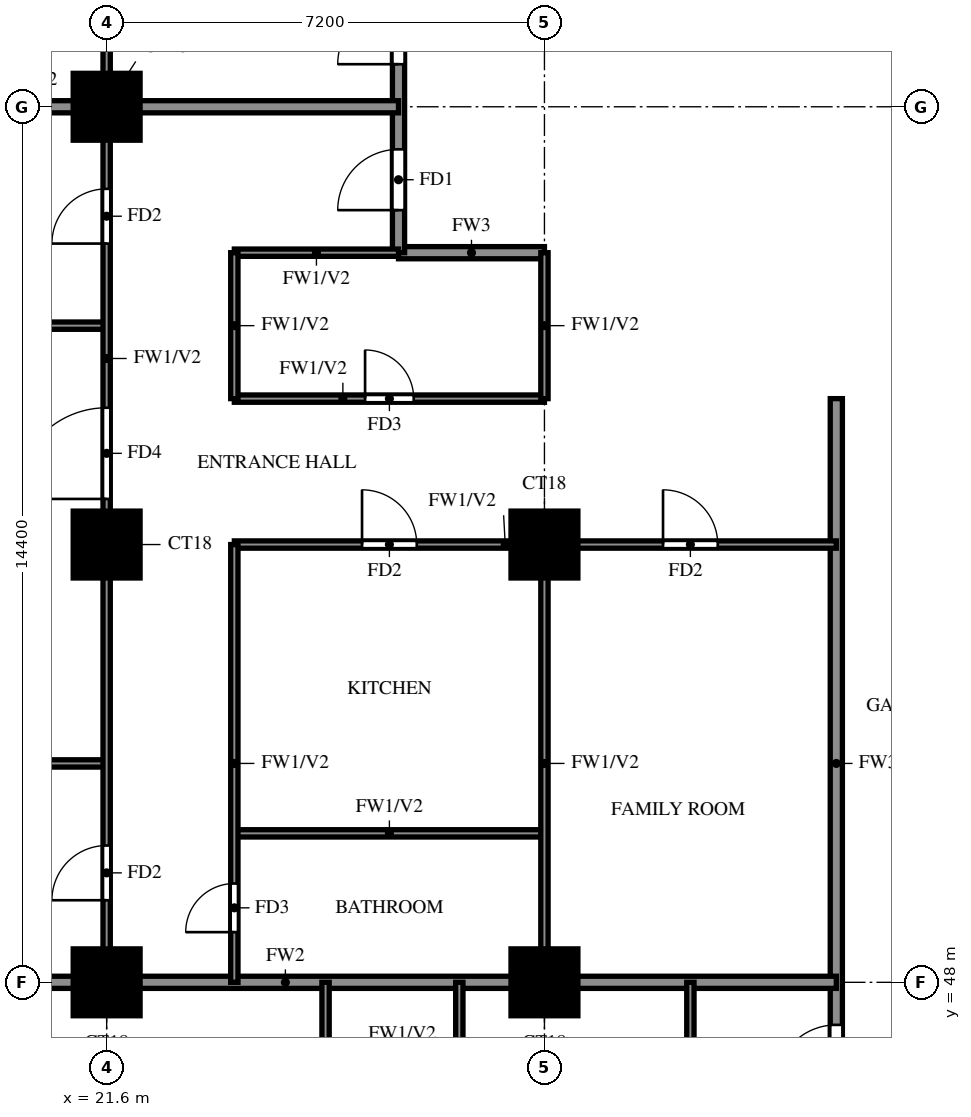
"""IFC4 building model, lengths in metres.
Left out: names, types, materials, properties, quantities, classifications, styles, units other than length and angle.
Written with IfcOpenShell. Run it as: python <this file> out.ifc"""

import sys

from ifc_helpers import new_model, si_unit, direction, frame, frame_2d, origin, origin_2d, place, context, subcontext, project, spatial, rectangle, extrude, source, transform, mapped, element, fill, save


model = new_model("IFC4")
c1 = context("Model", 3, precision=1e-05, world=origin(), true_north=direction((0.0, 1.0)))
c2 = subcontext(c1, "Body", "Model", "MODEL_VIEW")
j1 = project(units=[si_unit("LENGTHUNIT", "METRE"), si_unit("PLANEANGLEUNIT", "RADIAN")], contexts=[c1])
p1 = place(None, origin())
s1 = spatial("IfcSite", under=j1, at=p1, CompositionType="ELEMENT")
p2 = place(p1, origin())
s2 = spatial("IfcBuilding", under=s1, at=p2, CompositionType="ELEMENT")
p3 = place(p2, frame((0.0, 0.0, 113.0)))
s3 = spatial("IfcBuildingStorey", under=s2, at=p3, CompositionType="ELEMENT", Elevation=113.0)
m1 = source(origin(), c2, "Body", "SweptSolid", [
    extrude(rectangle(XDim=1.1, YDim=1.1, at=origin_2d()), origin(), (0.0, 0.0, 1.0), 3.2),
])
for number, where, z_axis, x_axis in (
    (1, (21.6, 48.0, 0.0), (0.0, 0.0, 1.0), (1.0, 0.0, 0.0)),
    (2, (28.8, 48.0, 0.0), (0.0, 0.0, 1.0), (1.0, 0.0, 0.0)),
    (3, (21.6, 55.2, 0.0), (0.0, 0.0, 1.0), (1.0, 0.0, 0.0)),
    (4, (28.8, 55.2, 0.0), (0.0, 0.0, 1.0), (1.0, 0.0, 0.0)),
    (5, (21.6, 62.4, 0.0), (0.0, 0.0, 1.0), (1.0, 0.0, 0.0)),
):
    element("IfcColumn", number, at=place(p3, frame(where, z_axis=z_axis, x_axis=x_axis)), inside=s3, PredefinedType="COLUMN", context=c2, shape_type="MappedRepresentation", body=[
        mapped(m1, transform((0.0, 0.0, 0.0))),
    ])
p4 = place(p3, frame((26.4, 60.0, 0.0), z_axis=(0.0, 0.0, 1.0), x_axis=(1.0, 0.0, 0.0)))
e6 = element("IfcWall", 6, at=p4, inside=s3, PredefinedType="SOLIDWALL", context=c2, shape_type="SweptSolid", body=[
    extrude(rectangle(XDim=2.4, YDim=0.2, at=frame_2d((1.2, 0.0))), origin(), (0.0, 0.0, 1.0), 3.2),
])
p5 = place(p3, frame((26.4, 60.0, 0.0), z_axis=(0.0, 0.0, 1.0), x_axis=(0.0, 1.0, 0.0)))
e7 = element("IfcWall", 7, at=p5, inside=s3, PredefinedType="SOLIDWALL", context=c2, shape_type="SweptSolid", body=[
    extrude(rectangle(XDim=9.6, YDim=0.2, at=frame_2d((4.8, 0.0))), origin(), (0.0, 0.0, 1.0), 3.2),
])
p6 = place(p5, frame((0.7, 0.0, 0.0)))
e8 = element("IfcOpeningElement", 8, at=p6, cuts=e7, PredefinedType="OPENING", context=c2, shape_type="SweptSolid", body=[
    extrude(rectangle(XDim=1.0, YDim=2.1, at=frame_2d((0.5, 1.05))), frame((0.0, 0.11, 0.0), z_axis=(0.0, -1.0, 0.0), x_axis=(1.0, 0.0, 0.0)), (0.0, 0.0, 1.0), 0.22),
])
p7 = place(p5, frame((3.1, 0.0, 0.0)))
e9 = element("IfcOpeningElement", 9, at=p7, cuts=e7, PredefinedType="OPENING", context=c2, shape_type="SweptSolid", body=[
    extrude(rectangle(XDim=1.0, YDim=2.1, at=frame_2d((0.5, 1.05))), frame((0.0, 0.11, 0.0), z_axis=(0.0, -1.0, 0.0), x_axis=(1.0, 0.0, 0.0)), (0.0, 0.0, 1.0), 0.22),
])
p8 = place(p3, frame((33.6, 45.6, 0.0), z_axis=(0.0, 0.0, 1.0), x_axis=(0.0, 1.0, 0.0)))
e10 = element("IfcWall", 10, at=p8, inside=s3, PredefinedType="SOLIDWALL", context=c2, shape_type="SweptSolid", body=[
    extrude(rectangle(XDim=12.0, YDim=0.2, at=frame_2d((6.0, 0.0))), origin(), (0.0, 0.0, 1.0), 3.2),
])
p9 = place(p8, frame((0.7, 0.0, 0.0)))
e11 = element("IfcOpeningElement", 11, at=p9, cuts=e10, PredefinedType="OPENING", context=c2, shape_type="SweptSolid", body=[
    extrude(rectangle(XDim=1.0, YDim=2.1, at=frame_2d((0.5, 1.05))), frame((0.0, 0.11, 0.0), z_axis=(0.0, -1.0, 0.0), x_axis=(1.0, 0.0, 0.0)), (0.0, 0.0, 1.0), 0.22),
])
p10 = place(p3, frame((14.525, 48.0, 0.0), z_axis=(0.0, 0.0, 1.0), x_axis=(1.0, 0.0, 0.0)))
e12 = element("IfcWall", 12, at=p10, inside=s3, PredefinedType="SOLIDWALL", context=c2, shape_type="SweptSolid", body=[
    extrude(rectangle(XDim=19.075, YDim=0.2, at=frame_2d((9.538, 0.0))), origin(), (0.0, 0.0, 1.0), 3.2),
])
p11 = place(p3, frame((14.525, 62.4, 0.0), z_axis=(0.0, 0.0, 1.0), x_axis=(1.0, 0.0, 0.0)))
e13 = element("IfcWall", 13, at=p11, inside=s3, PredefinedType="SOLIDWALL", context=c2, shape_type="SweptSolid", body=[
    extrude(rectangle(XDim=11.875, YDim=0.2, at=frame_2d((5.938, 0.0))), origin(), (0.0, 0.0, 1.0), 3.2),
])
p12 = place(p3, frame((23.7, 50.45, 0.0), z_axis=(0.0, 0.0, 1.0), x_axis=(1.0, 0.0, 0.0)))
e14 = element("IfcWall", 14, at=p12, inside=s3, PredefinedType="PARTITIONING", context=c2, shape_type="SweptSolid", body=[
    extrude(rectangle(XDim=5.1, YDim=0.12, at=frame_2d((2.55, 0.0))), origin(), (0.0, 0.0, 1.0), 3.2),
])
p13 = place(p3, frame((14.525, 51.6, 0.0), z_axis=(0.0, 0.0, 1.0), x_axis=(1.0, 0.0, 0.0)))
e15 = element("IfcWall", 15, at=p13, inside=s3, PredefinedType="PARTITIONING", context=c2, shape_type="SweptSolid", body=[
    extrude(rectangle(XDim=7.075, YDim=0.12, at=frame_2d((3.538, 0.0))), origin(), (0.0, 0.0, 1.0), 2.3),
])
p14 = place(p3, frame((23.7, 55.2, 0.0), z_axis=(0.0, 0.0, 1.0), x_axis=(1.0, 0.0, 0.0)))
e16 = element("IfcWall", 16, at=p14, inside=s3, PredefinedType="PARTITIONING", context=c2, shape_type="SweptSolid", body=[
    extrude(rectangle(XDim=9.9, YDim=0.12, at=frame_2d((4.95, 0.0))), origin(), (0.0, 0.0, 1.0), 3.2),
])
p15 = place(p14, frame((2.1, 0.0, 0.0)))
e17 = element("IfcOpeningElement", 17, at=p15, cuts=e16, PredefinedType="OPENING", context=c2, shape_type="SweptSolid", body=[
    extrude(rectangle(XDim=0.9, YDim=2.1, at=frame_2d((0.45, 1.05))), frame((0.0, 0.07, 0.0), z_axis=(0.0, -1.0, 0.0), x_axis=(1.0, 0.0, 0.0)), (0.0, 0.0, 1.0), 0.14),
])
p16 = place(p14, frame((7.05, 0.0, 0.0)))
e18 = element("IfcOpeningElement", 18, at=p16, cuts=e16, PredefinedType="OPENING", context=c2, shape_type="SweptSolid", body=[
    extrude(rectangle(XDim=0.9, YDim=2.1, at=frame_2d((0.45, 1.05))), frame((0.0, 0.07, 0.0), z_axis=(0.0, -1.0, 0.0), x_axis=(1.0, 0.0, 0.0)), (0.0, 0.0, 1.0), 0.14),
])
p17 = place(p3, frame((23.7, 57.6, 0.0), z_axis=(0.0, 0.0, 1.0), x_axis=(1.0, 0.0, 0.0)))
e19 = element("IfcWall", 19, at=p17, inside=s3, PredefinedType="PARTITIONING", context=c2, shape_type="SweptSolid", body=[
    extrude(rectangle(XDim=5.1, YDim=0.12, at=frame_2d((2.55, 0.0))), origin(), (0.0, 0.0, 1.0), 3.2),
])
p18 = place(p17, frame((2.15, 0.0, 0.0)))
e20 = element("IfcOpeningElement", 20, at=p18, cuts=e19, PredefinedType="OPENING", context=c2, shape_type="SweptSolid", body=[
    extrude(rectangle(XDim=0.8, YDim=2.1, at=frame_2d((0.4, 1.05))), frame((0.0, 0.07, 0.0), z_axis=(0.0, -1.0, 0.0), x_axis=(1.0, 0.0, 0.0)), (0.0, 0.0, 1.0), 0.14),
])
p19 = place(p3, frame((14.525, 58.8, 0.0), z_axis=(0.0, 0.0, 1.0), x_axis=(1.0, 0.0, 0.0)))
e21 = element("IfcWall", 21, at=p19, inside=s3, PredefinedType="PARTITIONING", context=c2, shape_type="SweptSolid", body=[
    extrude(rectangle(XDim=7.075, YDim=0.12, at=frame_2d((3.538, 0.0))), origin(), (0.0, 0.0, 1.0), 2.3),
])
p20 = place(p3, frame((23.7, 60.0, 0.0), z_axis=(0.0, 0.0, 1.0), x_axis=(1.0, 0.0, 0.0)))
e22 = element("IfcWall", 22, at=p20, inside=s3, PredefinedType="PARTITIONING", context=c2, shape_type="SweptSolid", body=[
    extrude(rectangle(XDim=2.7, YDim=0.12, at=frame_2d((1.35, 0.0))), origin(), (0.0, 0.0, 1.0), 3.2),
])
p21 = place(p3, frame((21.6, 48.0, 0.0), z_axis=(0.0, 0.0, 1.0), x_axis=(0.0, 1.0, 0.0)))
e23 = element("IfcWall", 23, at=p21, inside=s3, PredefinedType="PARTITIONING", context=c2, shape_type="SweptSolid", body=[
    extrude(rectangle(XDim=21.6, YDim=0.12, at=frame_2d((10.8, 0.0))), origin(), (0.0, 0.0, 1.0), 3.2),
])
p22 = place(p21, frame((1.35, 0.0, 0.0)))
e24 = element("IfcOpeningElement", 24, at=p22, cuts=e23, PredefinedType="OPENING", context=c2, shape_type="SweptSolid", body=[
    extrude(rectangle(XDim=0.9, YDim=2.1, at=frame_2d((0.45, 1.05))), frame((0.0, 0.07, 0.0), z_axis=(0.0, -1.0, 0.0), x_axis=(1.0, 0.0, 0.0)), (0.0, 0.0, 1.0), 0.14),
])
p23 = place(p21, frame((7.95, 0.0, 0.0)))
e25 = element("IfcOpeningElement", 25, at=p23, cuts=e23, PredefinedType="OPENING", context=c2, shape_type="SweptSolid", body=[
    extrude(rectangle(XDim=1.5, YDim=2.1, at=frame_2d((0.75, 1.05))), frame((0.0, 0.07, 0.0), z_axis=(0.0, -1.0, 0.0), x_axis=(1.0, 0.0, 0.0)), (0.0, 0.0, 1.0), 0.14),
])
p24 = place(p21, frame((12.15, 0.0, 0.0)))
e26 = element("IfcOpeningElement", 26, at=p24, cuts=e23, PredefinedType="OPENING", context=c2, shape_type="SweptSolid", body=[
    extrude(rectangle(XDim=0.9, YDim=2.1, at=frame_2d((0.45, 1.05))), frame((0.0, 0.07, 0.0), z_axis=(0.0, -1.0, 0.0), x_axis=(1.0, 0.0, 0.0)), (0.0, 0.0, 1.0), 0.14),
])
p25 = place(p21, frame((15.75, 0.0, 0.0)))
e27 = element("IfcOpeningElement", 27, at=p25, cuts=e23, PredefinedType="OPENING", context=c2, shape_type="SweptSolid", body=[
    extrude(rectangle(XDim=0.9, YDim=2.1, at=frame_2d((0.45, 1.05))), frame((0.0, 0.07, 0.0), z_axis=(0.0, -1.0, 0.0), x_axis=(1.0, 0.0, 0.0)), (0.0, 0.0, 1.0), 0.14),
])
p26 = place(p21, frame((19.35, 0.0, 0.0)))
e28 = element("IfcOpeningElement", 28, at=p26, cuts=e23, PredefinedType="OPENING", context=c2, shape_type="SweptSolid", body=[
    extrude(rectangle(XDim=0.9, YDim=2.1, at=frame_2d((0.45, 1.05))), frame((0.0, 0.07, 0.0), z_axis=(0.0, -1.0, 0.0), x_axis=(1.0, 0.0, 0.0)), (0.0, 0.0, 1.0), 0.14),
])
p27 = place(p3, frame((23.7, 48.0, 0.0), z_axis=(0.0, 0.0, 1.0), x_axis=(0.0, 1.0, 0.0)))
e29 = element("IfcWall", 29, at=p27, inside=s3, PredefinedType="PARTITIONING", context=c2, shape_type="SweptSolid", body=[
    extrude(rectangle(XDim=7.2, YDim=0.12, at=frame_2d((3.6, 0.0))), origin(), (0.0, 0.0, 1.0), 3.2),
])
p28 = place(p27, frame((0.825, 0.0, 0.0)))
e30 = element("IfcOpeningElement", 30, at=p28, cuts=e29, PredefinedType="OPENING", context=c2, shape_type="SweptSolid", body=[
    extrude(rectangle(XDim=0.8, YDim=2.1, at=frame_2d((0.4, 1.05))), frame((0.0, 0.07, 0.0), z_axis=(0.0, -1.0, 0.0), x_axis=(1.0, 0.0, 0.0)), (0.0, 0.0, 1.0), 0.14),
])
p29 = place(p3, frame((23.7, 57.6, 0.0), z_axis=(0.0, 0.0, 1.0), x_axis=(0.0, 1.0, 0.0)))
e31 = element("IfcWall", 31, at=p29, inside=s3, PredefinedType="PARTITIONING", context=c2, shape_type="SweptSolid", body=[
    extrude(rectangle(XDim=2.4, YDim=0.12, at=frame_2d((1.2, 0.0))), origin(), (0.0, 0.0, 1.0), 3.2),
])
p30 = place(p3, frame((25.2, 39.725, 0.0), z_axis=(0.0, 0.0, 1.0), x_axis=(0.0, 1.0, 0.0)))
e32 = element("IfcWall", 32, at=p30, inside=s3, PredefinedType="PARTITIONING", context=c2, shape_type="SweptSolid", body=[
    extrude(rectangle(XDim=8.275, YDim=0.12, at=frame_2d((4.137, 0.0))), origin(), (0.0, 0.0, 1.0), 3.2),
])
p31 = place(p30, frame((4.525, 0.0, 0.0)))
e33 = element("IfcOpeningElement", 33, at=p31, cuts=e32, PredefinedType="OPENING", context=c2, shape_type="SweptSolid", body=[
    extrude(rectangle(XDim=0.9, YDim=2.1, at=frame_2d((0.45, 1.05))), frame((0.0, 0.07, 0.0), z_axis=(0.0, -1.0, 0.0), x_axis=(1.0, 0.0, 0.0)), (0.0, 0.0, 1.0), 0.14),
])
p32 = place(p3, frame((27.4, 45.6, 0.0), z_axis=(0.0, 0.0, 1.0), x_axis=(0.0, 1.0, 0.0)))
e34 = element("IfcWall", 34, at=p32, inside=s3, PredefinedType="PARTITIONING", context=c2, shape_type="SweptSolid", body=[
    extrude(rectangle(XDim=2.4, YDim=0.12, at=frame_2d((1.2, 0.0))), origin(), (0.0, 0.0, 1.0), 3.2),
])
p33 = place(p3, frame((28.8, 48.0, 0.0), z_axis=(0.0, 0.0, 1.0), x_axis=(0.0, 1.0, 0.0)))
e35 = element("IfcWall", 35, at=p33, inside=s3, PredefinedType="PARTITIONING", context=c2, shape_type="SweptSolid", body=[
    extrude(rectangle(XDim=7.2, YDim=0.12, at=frame_2d((3.6, 0.0))), origin(), (0.0, 0.0, 1.0), 3.2),
])
for number, where, z_axis, x_axis in (
    (36, (28.8, 57.6, 0.0), (0.0, 0.0, 1.0), (0.0, 1.0, 0.0)),
    (37, (31.2, 45.6, 0.0), (0.0, 0.0, 1.0), (0.0, 1.0, 0.0)),
):
    element("IfcWall", number, at=place(p3, frame(where, z_axis=z_axis, x_axis=x_axis)), inside=s3, PredefinedType="PARTITIONING", context=c2, shape_type="SweptSolid", body=[
        extrude(rectangle(XDim=2.4, YDim=0.12, at=frame_2d((1.2, 0.0))), origin(), (0.0, 0.0, 1.0), 3.2),
    ])
p34 = place(p9, origin())
e38 = element("IfcDoor", 38, at=p34, inside=s3, OperationType="SINGLE_SWING_LEFT", PredefinedType="DOOR", context=c2, shape_type="SweptSolid", body=[
    extrude(rectangle(XDim=1.0, YDim=2.1, at=frame_2d((0.5, 1.05))), frame((0.0, 0.025, 0.0), z_axis=(0.0, -1.0, 0.0), x_axis=(1.0, 0.0, 0.0)), (0.0, 0.0, 1.0), 0.05),
])
fill(e11, e38)
p35 = place(p6, origin())
e39 = element("IfcDoor", 39, at=p35, inside=s3, OperationType="SINGLE_SWING_RIGHT", PredefinedType="DOOR", context=c2, shape_type="SweptSolid", body=[
    extrude(rectangle(XDim=1.0, YDim=2.1, at=frame_2d((0.5, 1.05))), frame((0.0, 0.025, 0.0), z_axis=(0.0, -1.0, 0.0), x_axis=(1.0, 0.0, 0.0)), (0.0, 0.0, 1.0), 0.05),
])
fill(e8, e39)
p36 = place(p22, origin())
e40 = element("IfcDoor", 40, at=p36, inside=s3, OperationType="SINGLE_SWING_LEFT", PredefinedType="DOOR", context=c2, shape_type="SweptSolid", body=[
    extrude(rectangle(XDim=0.9, YDim=2.1, at=frame_2d((0.45, 1.05))), frame((0.0, 0.025, 0.0), z_axis=(0.0, -1.0, 0.0), x_axis=(1.0, 0.0, 0.0)), (0.0, 0.0, 1.0), 0.05),
])
fill(e24, e40)
p37 = place(p23, origin())
e41 = element("IfcDoor", 41, at=p37, inside=s3, OperationType="SINGLE_SWING_RIGHT", PredefinedType="DOOR", context=c2, shape_type="SweptSolid", body=[
    extrude(rectangle(XDim=1.5, YDim=2.1, at=frame_2d((0.75, 1.05))), frame((0.0, 0.025, 0.0), z_axis=(0.0, -1.0, 0.0), x_axis=(1.0, 0.0, 0.0)), (0.0, 0.0, 1.0), 0.05),
])
fill(e25, e41)
p38 = place(p24, origin())
e42 = element("IfcDoor", 42, at=p38, inside=s3, OperationType="SINGLE_SWING_RIGHT", PredefinedType="DOOR", context=c2, shape_type="SweptSolid", body=[
    extrude(rectangle(XDim=0.9, YDim=2.1, at=frame_2d((0.45, 1.05))), frame((0.0, 0.025, 0.0), z_axis=(0.0, -1.0, 0.0), x_axis=(1.0, 0.0, 0.0)), (0.0, 0.0, 1.0), 0.05),
])
fill(e26, e42)
p39 = place(p28, origin())
e43 = element("IfcDoor", 43, at=p39, inside=s3, OperationType="SINGLE_SWING_LEFT", PredefinedType="DOOR", context=c2, shape_type="SweptSolid", body=[
    extrude(rectangle(XDim=0.8, YDim=2.1, at=frame_2d((0.4, 1.05))), frame((0.0, 0.025, 0.0), z_axis=(0.0, -1.0, 0.0), x_axis=(1.0, 0.0, 0.0)), (0.0, 0.0, 1.0), 0.05),
])
fill(e30, e43)
p40 = place(p15, origin())
e44 = element("IfcDoor", 44, at=p40, inside=s3, OperationType="SINGLE_SWING_LEFT", PredefinedType="DOOR", context=c2, shape_type="SweptSolid", body=[
    extrude(rectangle(XDim=0.9, YDim=2.1, at=frame_2d((0.45, 1.05))), frame((0.0, 0.025, 0.0), z_axis=(0.0, -1.0, 0.0), x_axis=(1.0, 0.0, 0.0)), (0.0, 0.0, 1.0), 0.05),
])
fill(e17, e44)
p41 = place(p18, origin())
e45 = element("IfcDoor", 45, at=p41, inside=s3, OperationType="SINGLE_SWING_RIGHT", PredefinedType="DOOR", context=c2, shape_type="SweptSolid", body=[
    extrude(rectangle(XDim=0.8, YDim=2.1, at=frame_2d((0.4, 1.05))), frame((0.0, 0.025, 0.0), z_axis=(0.0, -1.0, 0.0), x_axis=(1.0, 0.0, 0.0)), (0.0, 0.0, 1.0), 0.05),
])
fill(e20, e45)
p42 = place(p16, origin())
e46 = element("IfcDoor", 46, at=p42, inside=s3, OperationType="SINGLE_SWING_LEFT", PredefinedType="DOOR", context=c2, shape_type="SweptSolid", body=[
    extrude(rectangle(XDim=0.9, YDim=2.1, at=frame_2d((0.45, 1.05))), frame((0.0, 0.025, 0.0), z_axis=(0.0, -1.0, 0.0), x_axis=(1.0, 0.0, 0.0)), (0.0, 0.0, 1.0), 0.05),
])
fill(e18, e46)
p43 = place(p7, origin())
e47 = element("IfcDoor", 47, at=p43, inside=s3, OperationType="SINGLE_SWING_LEFT", PredefinedType="DOOR", context=c2, shape_type="SweptSolid", body=[
    extrude(rectangle(XDim=1.0, YDim=2.1, at=frame_2d((0.5, 1.05))), frame((0.0, 0.025, 0.0), z_axis=(0.0, -1.0, 0.0), x_axis=(1.0, 0.0, 0.0)), (0.0, 0.0, 1.0), 0.05),
])
fill(e9, e47)
save(model, sys.argv[1])
